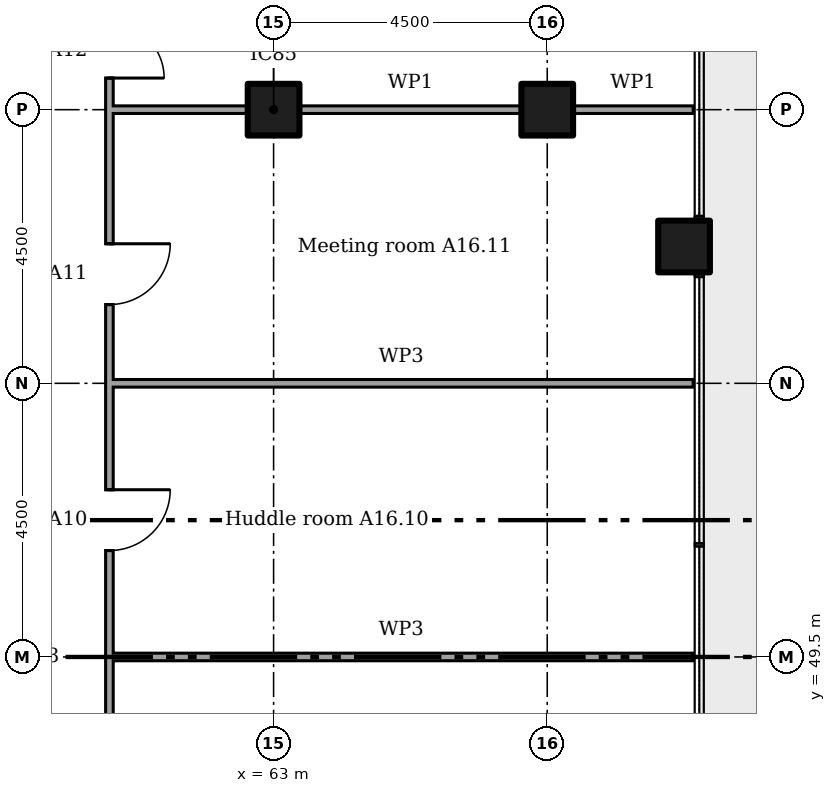
"""IFC4 building model, lengths in metres.
Left out: names, types, materials, properties, quantities, classifications, styles, units other than length and angle.
Written with IfcOpenShell. Run it as: python <this file> out.ifc"""

import sys

from ifc_helpers import new_model, si_unit, direction, frame, frame_2d, origin, origin_2d, place, context, subcontext, project, spatial, rectangle, extrude, element, fill, save


model = new_model("IFC4")
c1 = context("Model", 3, precision=1e-05, world=origin(), true_north=direction((0.0, 1.0)))
c2 = subcontext(c1, "Body", "Model", "MODEL_VIEW")
j1 = project(units=[si_unit("LENGTHUNIT", "METRE"), si_unit("PLANEANGLEUNIT", "RADIAN")], contexts=[c1])
p1 = place(None, origin())
s1 = spatial("IfcSite", under=j1, at=p1, CompositionType="ELEMENT")
p2 = place(p1, origin())
s2 = spatial("IfcBuilding", under=s1, at=p2, CompositionType="ELEMENT")
p3 = place(p2, frame((0.0, 0.0, 69.0)))
s3 = spatial("IfcBuildingStorey", under=s2, at=p3, CompositionType="ELEMENT", Elevation=69.0)
for number, where in (
    (1, (63.0, 58.5, 0.0)),
    (2, (67.5, 58.5, 0.0)),
    (3, (69.75, 56.25, 0.0)),
):
    element("IfcColumn", number, at=place(p3, frame(where)), inside=s3, PredefinedType="COLUMN", context=c2, shape_type="SweptSolid", body=[
        extrude(rectangle(XDim=0.85, YDim=0.85, at=origin_2d()), origin(), (0.0, 0.0, 1.0), 3.6),
    ])
for number, where in (
    (4, (60.3, 49.5, 0.0)),
    (5, (60.3, 54.0, 0.0)),
):
    element("IfcWall", number, at=place(p3, frame(where)), inside=s3, PredefinedType="MOVABLE", context=c2, shape_type="SweptSolid", body=[
        extrude(rectangle(XDim=9.6, YDim=0.125, at=frame_2d((4.8, 0.0))), origin(), (0.0, 0.0, 1.0), 2.766),
    ])
p4 = place(p3, frame((60.3, 58.5, 0.0)))
e6 = element("IfcWall", 6, at=p4, inside=s3, PredefinedType="PARTITIONING", context=c2, shape_type="SweptSolid", body=[
    extrude(rectangle(XDim=2.275, YDim=0.125, at=frame_2d((1.137, 0.0))), origin(), (0.0, 0.0, 1.0), 2.676),
])
p5 = place(p3, frame((63.425, 58.5, 0.0)))
e7 = element("IfcWall", 7, at=p5, inside=s3, PredefinedType="PARTITIONING", context=c2, shape_type="SweptSolid", body=[
    extrude(rectangle(XDim=3.65, YDim=0.125, at=frame_2d((1.825, 0.0))), origin(), (0.0, 0.0, 1.0), 2.676),
])
p6 = place(p3, frame((67.925, 58.5, 0.0)))
e8 = element("IfcWall", 8, at=p6, inside=s3, PredefinedType="PARTITIONING", context=c2, shape_type="SweptSolid", body=[
    extrude(rectangle(XDim=1.975, YDim=0.125, at=frame_2d((0.987, 0.0))), origin(), (0.0, 0.0, 1.0), 2.676),
])
p7 = place(p3, frame((60.3, 38.762, 0.0), z_axis=(0.0, 0.0, 1.0), x_axis=(0.0, 1.0, 0.0)))
e9 = element("IfcWall", 9, at=p7, inside=s3, PredefinedType="PARTITIONING", context=c2, shape_type="SweptSolid", body=[
    extrude(rectangle(XDim=21.475, YDim=0.125, at=frame_2d((10.738, 0.0))), origin(), (0.0, 0.0, 1.0), 3.45),
])
p8 = place(p7, frame((3.032, 0.0, 0.0)))
e10 = element("IfcOpeningElement", 10, at=p8, cuts=e9, PredefinedType="OPENING", context=c2, shape_type="SweptSolid", body=[
    extrude(rectangle(XDim=1.0, YDim=2.1, at=frame_2d((0.5, 1.05))), frame((0.0, 0.073, 0.0), z_axis=(0.0, -1.0, 0.0), x_axis=(1.0, 0.0, 0.0)), (0.0, 0.0, 1.0), 0.145),
])
p9 = place(p7, frame((8.442, 0.0, 0.0)))
e11 = element("IfcOpeningElement", 11, at=p9, cuts=e9, PredefinedType="OPENING", context=c2, shape_type="SweptSolid", body=[
    extrude(rectangle(XDim=1.0, YDim=2.1, at=frame_2d((0.5, 1.05))), frame((0.0, 0.073, 0.0), z_axis=(0.0, -1.0, 0.0), x_axis=(1.0, 0.0, 0.0)), (0.0, 0.0, 1.0), 0.145),
])
p10 = place(p7, frame((12.488, 0.0, 0.0)))
e12 = element("IfcOpeningElement", 12, at=p10, cuts=e9, PredefinedType="OPENING", context=c2, shape_type="SweptSolid", body=[
    extrude(rectangle(XDim=1.0, YDim=2.1, at=frame_2d((0.5, 1.05))), frame((0.0, 0.073, 0.0), z_axis=(0.0, -1.0, 0.0), x_axis=(1.0, 0.0, 0.0)), (0.0, 0.0, 1.0), 0.145),
])
p11 = place(p7, frame((16.532, 0.0, 0.0)))
e13 = element("IfcOpeningElement", 13, at=p11, cuts=e9, PredefinedType="OPENING", context=c2, shape_type="SweptSolid", body=[
    extrude(rectangle(XDim=1.0, YDim=2.1, at=frame_2d((0.5, 1.05))), frame((0.0, 0.073, 0.0), z_axis=(0.0, -1.0, 0.0), x_axis=(1.0, 0.0, 0.0)), (0.0, 0.0, 1.0), 0.145),
])
p12 = place(p7, frame((20.258, 0.0, 0.0)))
e14 = element("IfcOpeningElement", 14, at=p12, cuts=e9, PredefinedType="OPENING", context=c2, shape_type="SweptSolid", body=[
    extrude(rectangle(XDim=0.9, YDim=2.1, at=frame_2d((0.45, 1.05))), frame((0.0, 0.073, 0.0), z_axis=(0.0, -1.0, 0.0), x_axis=(1.0, 0.0, 0.0)), (0.0, 0.0, 1.0), 0.145),
])
p13 = place(p10, frame((1.0, 0.0, 0.0), x_axis=(-1.0, 0.0, 0.0)))
e15 = element("IfcDoor", 15, at=p13, inside=s3, OperationType="SINGLE_SWING_RIGHT", PredefinedType="DOOR", context=c2, shape_type="SweptSolid", body=[
    extrude(rectangle(XDim=1.0, YDim=2.1, at=frame_2d((0.5, 1.05))), frame((0.0, 0.025, 0.0), z_axis=(0.0, -1.0, 0.0), x_axis=(1.0, 0.0, 0.0)), (0.0, 0.0, 1.0), 0.05),
])
fill(e12, e15)
p14 = place(p11, frame((1.0, 0.0, 0.0), x_axis=(-1.0, 0.0, 0.0)))
e16 = element("IfcDoor", 16, at=p14, inside=s3, OperationType="SINGLE_SWING_RIGHT", PredefinedType="DOOR", context=c2, shape_type="SweptSolid", body=[
    extrude(rectangle(XDim=1.0, YDim=2.1, at=frame_2d((0.5, 1.05))), frame((0.0, 0.025, 0.0), z_axis=(0.0, -1.0, 0.0), x_axis=(1.0, 0.0, 0.0)), (0.0, 0.0, 1.0), 0.05),
])
fill(e13, e16)
p15 = place(p12, frame((0.9, 0.0, 0.0), x_axis=(-1.0, 0.0, 0.0)))
e17 = element("IfcDoor", 17, at=p15, inside=s3, OperationType="SINGLE_SWING_LEFT", PredefinedType="DOOR", context=c2, shape_type="SweptSolid", body=[
    extrude(rectangle(XDim=0.9, YDim=2.1, at=frame_2d((0.45, 1.05))), frame((0.0, 0.025, 0.0), z_axis=(0.0, -1.0, 0.0), x_axis=(1.0, 0.0, 0.0)), (0.0, 0.0, 1.0), 0.05),
])
fill(e14, e17)
save(model, sys.argv[1])
